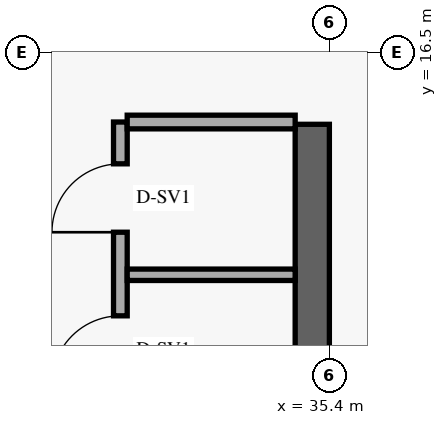
"""IFC4 building model, lengths in metres.
Left out: names, types, materials, properties, quantities, classifications, styles, units other than length and angle.
Written with IfcOpenShell. Run it as: python <this file> out.ifc"""

import sys

from ifc_helpers import new_model, si_unit, direction, frame, frame_2d, origin, place, context, subcontext, project, spatial, rectangle, extrude, element, fill, save


model = new_model("IFC4")
c1 = context("Model", 3, precision=1e-05, world=origin(), true_north=direction((0.0, 1.0)))
c2 = subcontext(c1, "Body", "Model", "MODEL_VIEW")
j1 = project(units=[si_unit("LENGTHUNIT", "METRE"), si_unit("PLANEANGLEUNIT", "RADIAN")], contexts=[c1])
p1 = place(None, origin())
s1 = spatial("IfcSite", under=j1, at=p1, CompositionType="ELEMENT")
p2 = place(p1, origin())
s2 = spatial("IfcBuilding", under=s1, at=p2, CompositionType="ELEMENT")
p3 = place(p2, frame((0.0, 0.0, -9.6)))
s3 = spatial("IfcBuildingStorey", under=s2, at=p3, CompositionType="ELEMENT", Elevation=-9.6)
p4 = place(p3, frame((35.175, 9.95, 0.0), z_axis=(0.0, 0.0, 1.0), x_axis=(0.0, 1.0, 0.0)))
e1 = element("IfcWall", 1, at=p4, inside=s3, PredefinedType="SHEAR", context=c2, shape_type="SweptSolid", body=[
    extrude(rectangle(XDim=5.6, YDim=0.45, at=frame_2d((2.8, 0.0))), origin(), (0.0, 0.0, 1.0), 3.629),
])
p5 = place(p3, frame((32.65, 9.5, 0.0), z_axis=(0.0, 0.0, 1.0), x_axis=(0.0, 1.0, 0.0)))
e2 = element("IfcWall", 2, at=p5, inside=s3, PredefinedType="STANDARD", context=c2, shape_type="SweptSolid", body=[
    extrude(rectangle(XDim=6.08, YDim=0.18, at=frame_2d((3.04, 0.0))), origin(), (0.0, 0.0, 1.0), 4.48),
])
p6 = place(p5, frame((0.63, 0.0, 0.0)))
e3 = element("IfcOpeningElement", 3, at=p6, cuts=e2, PredefinedType="OPENING", context=c2, shape_type="SweptSolid", body=[
    extrude(rectangle(XDim=0.9, YDim=2.1, at=frame_2d((0.45, 1.05))), frame((0.0, 0.1, 0.0), z_axis=(0.0, -1.0, 0.0), x_axis=(1.0, 0.0, 0.0)), (0.0, 0.0, 1.0), 0.2),
])
p7 = place(p5, frame((2.63, 0.0, 0.0)))
e4 = element("IfcOpeningElement", 4, at=p7, cuts=e2, PredefinedType="OPENING", context=c2, shape_type="SweptSolid", body=[
    extrude(rectangle(XDim=0.9, YDim=2.1, at=frame_2d((0.45, 1.05))), frame((0.0, 0.1, 0.0), z_axis=(0.0, -1.0, 0.0), x_axis=(1.0, 0.0, 0.0)), (0.0, 0.0, 1.0), 0.2),
])
p8 = place(p5, frame((4.63, 0.0, 0.0)))
e5 = element("IfcOpeningElement", 5, at=p8, cuts=e2, PredefinedType="OPENING", context=c2, shape_type="SweptSolid", body=[
    extrude(rectangle(XDim=0.9, YDim=2.1, at=frame_2d((0.45, 1.05))), frame((0.0, 0.1, 0.0), z_axis=(0.0, -1.0, 0.0), x_axis=(1.0, 0.0, 0.0)), (0.0, 0.0, 1.0), 0.2),
])
p9 = place(p3, frame((32.74, 15.58, 0.0), z_axis=(0.0, 0.0, 1.0), x_axis=(1.0, 0.0, 0.0)))
e6 = element("IfcWall", 6, at=p9, inside=s3, PredefinedType="STANDARD", context=c2, shape_type="SweptSolid", body=[
    extrude(rectangle(XDim=2.21, YDim=0.18, at=frame_2d((1.105, 0.0))), origin(), (0.0, 0.0, 1.0), 4.48),
])
p10 = place(p3, frame((32.74, 13.57, 0.0), z_axis=(0.0, 0.0, 1.0), x_axis=(1.0, 0.0, 0.0)))
e7 = element("IfcWall", 7, at=p10, inside=s3, PredefinedType="STANDARD", context=c2, shape_type="SweptSolid", body=[
    extrude(rectangle(XDim=2.21, YDim=0.15, at=frame_2d((1.105, 0.0))), origin(), (0.0, 0.0, 1.0), 4.48),
])
p11 = place(p7, origin())
e8 = element("IfcDoor", 8, at=p11, inside=s3, OperationType="SINGLE_SWING_LEFT", PredefinedType="DOOR", context=c2, shape_type="SweptSolid", body=[
    extrude(rectangle(XDim=0.9, YDim=2.1, at=frame_2d((0.45, 1.05))), frame((0.0, 0.025, 0.0), z_axis=(0.0, -1.0, 0.0), x_axis=(1.0, 0.0, 0.0)), (0.0, 0.0, 1.0), 0.05),
])
fill(e4, e8)
p12 = place(p8, origin())
e9 = element("IfcDoor", 9, at=p12, inside=s3, OperationType="SINGLE_SWING_LEFT", PredefinedType="DOOR", context=c2, shape_type="SweptSolid", body=[
    extrude(rectangle(XDim=0.9, YDim=2.1, at=frame_2d((0.45, 1.05))), frame((0.0, 0.025, 0.0), z_axis=(0.0, -1.0, 0.0), x_axis=(1.0, 0.0, 0.0)), (0.0, 0.0, 1.0), 0.05),
])
fill(e5, e9)
save(model, sys.argv[1])
